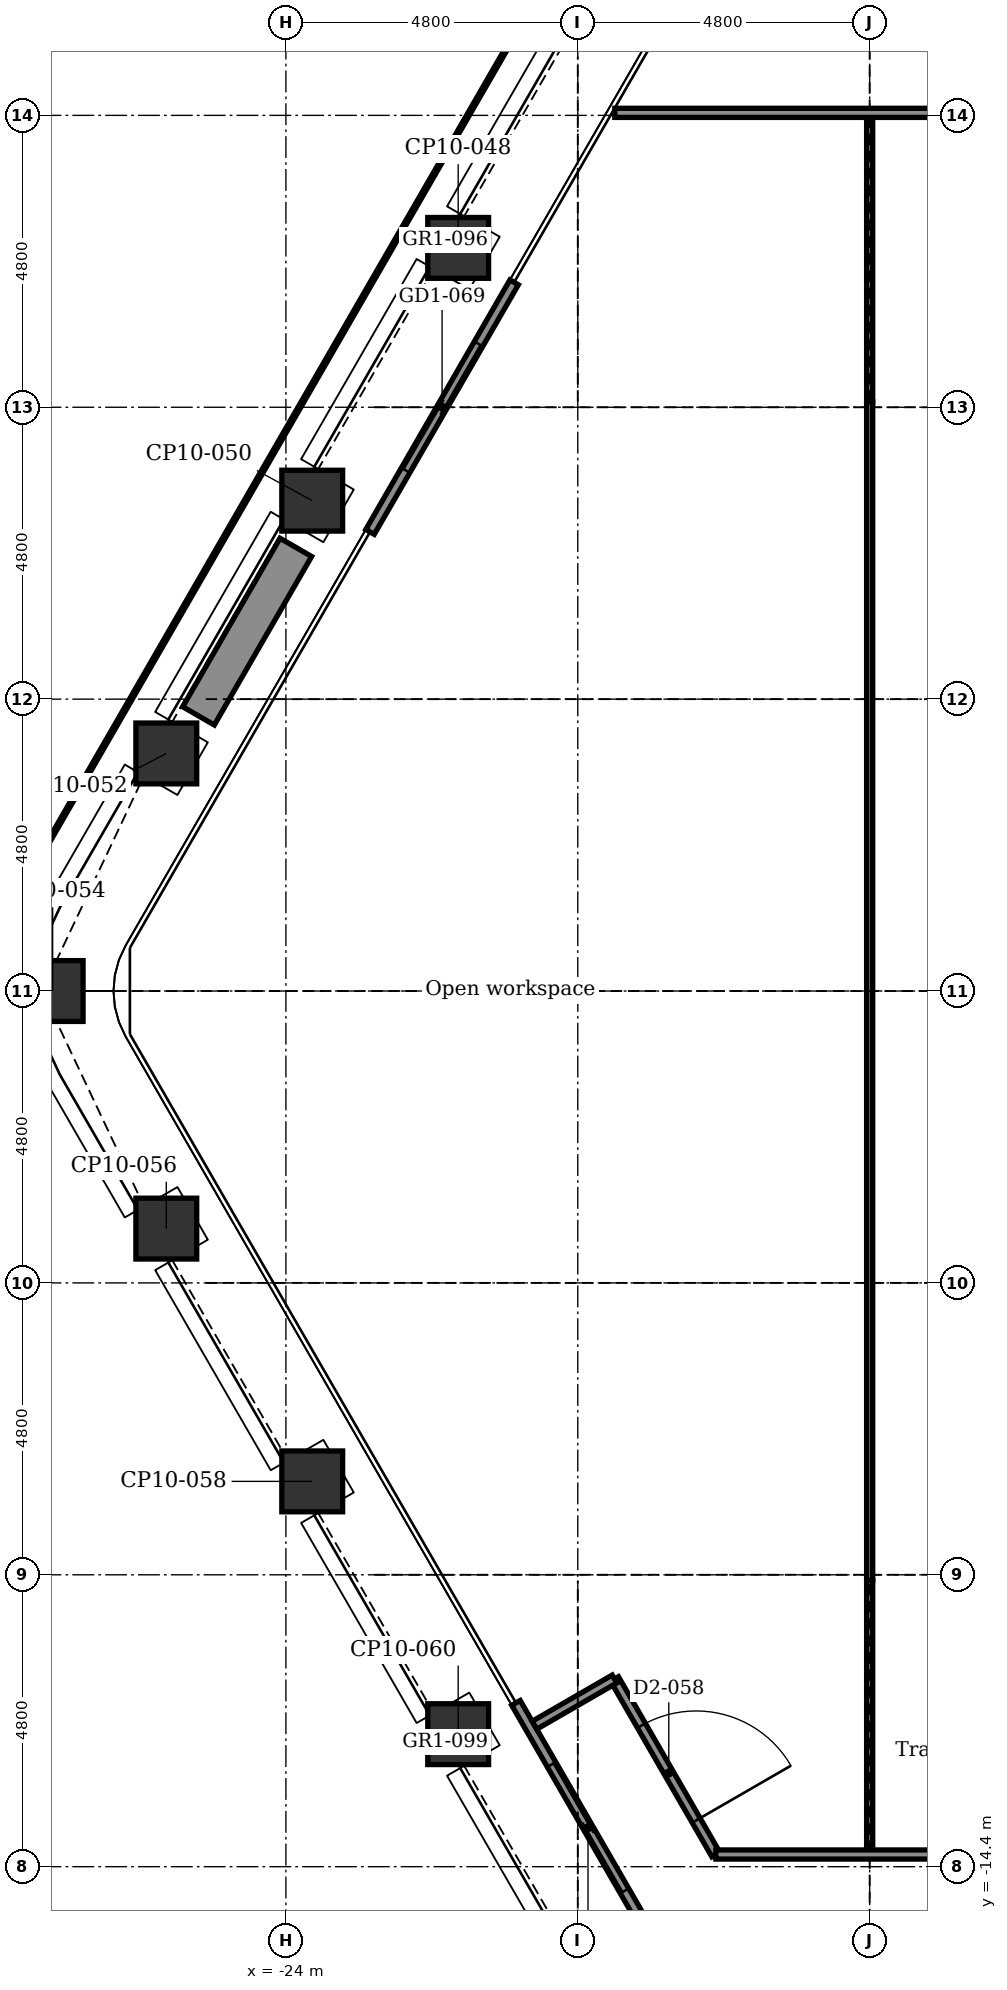
"""IFC4 building model, lengths in metres.
Left out: names, types, materials, properties, quantities, classifications, styles, units other than length and angle.
Written with IfcOpenShell. Run it as: python <this file> out.ifc"""

import sys

from ifc_helpers import new_model, si_unit, direction, frame, frame_2d, origin, origin_2d, place, context, subcontext, project, spatial, rectangle, extrude, element, fill, save


model = new_model("IFC4")
c1 = context("Model", 3, precision=1e-05, world=origin(), true_north=direction((0.0, 1.0)))
c2 = subcontext(c1, "Body", "Model", "MODEL_VIEW")
j1 = project(units=[si_unit("LENGTHUNIT", "METRE"), si_unit("PLANEANGLEUNIT", "RADIAN")], contexts=[c1])
p1 = place(None, origin())
s1 = spatial("IfcSite", under=j1, at=p1, CompositionType="ELEMENT")
p2 = place(p1, origin())
s2 = spatial("IfcBuilding", under=s1, at=p2, CompositionType="ELEMENT")
p3 = place(p2, frame((0.0, 0.0, 197.3)))
s3 = spatial("IfcBuildingStorey", under=s2, at=p3, CompositionType="ELEMENT", Elevation=197.3)
for number, where, z_axis, x_axis in (
    (1, (-21.167, -12.221, -0.15), (0.0, 0.0, 1.0), (0.866, 0.5, 0.0)),
    (2, (-23.567, -8.064, -0.15), (0.0, 0.0, 1.0), (0.866, 0.5, 0.0)),
    (3, (-25.967, -3.907, -0.15), (0.0, 0.0, 1.0), (0.866, 0.5, 0.0)),
    (4, (-27.836, 0.0, -0.15), (0.0, 0.0, 1.0), (1.0, 0.0, 0.0)),
    (5, (-25.967, 3.907, -0.15), (0.0, 0.0, 1.0), (0.5, 0.866, 0.0)),
    (6, (-23.567, 8.064, -0.15), (0.0, 0.0, 1.0), (0.5, 0.866, 0.0)),
    (7, (-21.167, 12.221, -0.15), (0.0, 0.0, 1.0), (0.5, 0.866, 0.0)),
):
    element("IfcColumn", number, at=place(p3, frame(where, z_axis=z_axis, x_axis=x_axis)), inside=s3, PredefinedType="COLUMN", context=c2, shape_type="SweptSolid", body=[
        extrude(rectangle(XDim=1.0, YDim=1.0, at=origin_2d()), origin(), (0.0, 0.0, 1.0), 3.9),
    ])
p4 = place(p3, frame((-17.847, -15.812, 0.0), z_axis=(0.0, 0.0, 1.0), x_axis=(-0.5000167099, 0.866015756104, 0.0)))
e8 = element("IfcWall", 8, at=p4, inside=s3, PredefinedType="PARTITIONING", context=c2, shape_type="SweptSolid", body=[
    extrude(rectangle(XDim=4.74, YDim=0.16, at=frame_2d((2.37, 0.0))), origin(), (0.0, 0.0, 1.0), 3.75),
])
p5 = place(p4, frame((1.17, 0.0, 0.0)))
e9 = element("IfcOpeningElement", 9, at=p5, cuts=e8, PredefinedType="OPENING", context=c2, shape_type="SweptSolid", body=[
    extrude(rectangle(XDim=2.4, YDim=2.4, at=frame_2d((1.2, 1.2))), frame((0.0, 0.09, 0.0), z_axis=(0.0, -1.0, 0.0), x_axis=(1.0, 0.0, 0.0)), (0.0, 0.0, 1.0), 0.18),
])
p6 = place(p3, frame((-22.617, 7.55, 0.0), z_axis=(0.0, 0.0, 1.0), x_axis=(0.5000167099, 0.866015756104, 0.0)))
e10 = element("IfcWall", 10, at=p6, inside=s3, PredefinedType="PARTITIONING", context=c2, shape_type="SweptSolid", body=[
    extrude(rectangle(XDim=4.74, YDim=0.16, at=frame_2d((2.37, 0.0))), origin(), (0.0, 0.0, 1.0), 3.75),
])
p7 = place(p6, frame((1.17, 0.0, 0.0)))
e11 = element("IfcOpeningElement", 11, at=p7, cuts=e10, PredefinedType="OPENING", context=c2, shape_type="SweptSolid", body=[
    extrude(rectangle(XDim=2.4, YDim=2.4, at=frame_2d((1.2, 1.2))), frame((0.0, 0.09, 0.0), z_axis=(0.0, -1.0, 0.0), x_axis=(1.0, 0.0, 0.0)), (0.0, 0.0, 1.0), 0.18),
])
p8 = place(p3, frame((-25.437, 4.525, 0.0), z_axis=(0.0, 0.0, 1.0), x_axis=(0.499938187974, 0.866061088033, 0.0)))
e12 = element("IfcWall", 12, at=p8, inside=s3, PredefinedType="USERDEFINED", context=c2, shape_type="SweptSolid", body=[
    extrude(rectangle(XDim=3.2, YDim=0.6, at=frame_2d((1.6, 0.0))), origin(), (0.0, 0.0, 1.0), 0.7),
])
p9 = place(p3, frame((-14.4, -9.694, 0.0), z_axis=(0.0, 0.0, 1.0), x_axis=(0.0, 1.0, 0.0)))
e13 = element("IfcWall", 13, at=p9, inside=s3, PredefinedType="PARTITIONING", context=c2, shape_type="SweptSolid", body=[
    extrude(rectangle(XDim=19.387, YDim=0.1, at=frame_2d((9.694, 0.0))), origin(), (0.0, 0.0, 1.0), 3.75),
])
p10 = place(p3, frame((-14.4, -14.2, 0.0), z_axis=(0.0, 0.0, 1.0), x_axis=(0.0, 1.0, 0.0)))
e14 = element("IfcWall", 14, at=p10, inside=s3, PredefinedType="PARTITIONING", context=c2, shape_type="SweptSolid", body=[
    extrude(rectangle(XDim=4.506, YDim=0.1, at=frame_2d((2.253, 0.0))), origin(), (0.0, 0.0, 1.0), 3.066),
])
p11 = place(p3, frame((-14.4, 9.694, 0.0), z_axis=(0.0, 0.0, 1.0), x_axis=(0.0, 1.0, 0.0)))
e15 = element("IfcWall", 15, at=p11, inside=s3, PredefinedType="PARTITIONING", context=c2, shape_type="SweptSolid", body=[
    extrude(rectangle(XDim=4.748, YDim=0.1, at=frame_2d((2.374, 0.0))), origin(), (0.0, 0.0, 1.0), 3.066),
])
p12 = place(p3, frame((-18.596, -11.314, 0.0), z_axis=(0.0, 0.0, 1.0), x_axis=(0.499976106316, -0.86603919837, 0.0)))
e16 = element("IfcWall", 16, at=p12, inside=s3, PredefinedType="PARTITIONING", context=c2, shape_type="SweptSolid", body=[
    extrude(rectangle(XDim=3.333, YDim=0.15, at=frame_2d((1.667, 0.0))), origin(), (0.0, 0.0, 1.0), 3.75),
])
p13 = place(p12, frame((0.885, 0.0, 0.0)))
e17 = element("IfcOpeningElement", 17, at=p13, cuts=e16, PredefinedType="OPENING", context=c2, shape_type="SweptSolid", body=[
    extrude(rectangle(XDim=1.8, YDim=2.1, at=frame_2d((0.9, 1.05))), frame((0.0, 0.085, 0.0), z_axis=(0.0, -1.0, 0.0), x_axis=(1.0, 0.0, 0.0)), (0.0, 0.0, 1.0), 0.17),
])
p14 = place(p3, frame((-19.912, -12.074, 0.0), z_axis=(0.0, 0.0, 1.0), x_axis=(0.866030456496, 0.499991248344, 0.0)))
e18 = element("IfcWall", 18, at=p14, inside=s3, PredefinedType="PARTITIONING", context=c2, shape_type="SweptSolid", body=[
    extrude(rectangle(XDim=1.52, YDim=0.15, at=frame_2d((0.76, 0.0))), origin(), (0.0, 0.0, 1.0), 3.75),
])
p15 = place(p3, frame((-16.93, -14.2, 0.0), z_axis=(0.0, 0.0, 1.0), x_axis=(1.0, 0.0, 0.0)))
e19 = element("IfcWall", 19, at=p15, inside=s3, PredefinedType="PARTITIONING", context=c2, shape_type="SweptSolid", body=[
    extrude(rectangle(XDim=19.93, YDim=0.15, at=frame_2d((9.965, 0.0))), origin(), (0.0, 0.0, 1.0), 3.75),
])
p16 = place(p15, frame((8.58, 0.0, 0.0)))
e20 = element("IfcOpeningElement", 20, at=p16, cuts=e19, PredefinedType="OPENING", context=c2, shape_type="SweptSolid", body=[
    extrude(rectangle(XDim=0.9, YDim=2.1, at=frame_2d((0.45, 1.05))), frame((0.0, 0.085, 0.0), z_axis=(0.0, -1.0, 0.0), x_axis=(1.0, 0.0, 0.0)), (0.0, 0.0, 1.0), 0.17),
])
p17 = place(p15, frame((14.08, 0.0, 0.0)))
e21 = element("IfcOpeningElement", 21, at=p17, cuts=e19, PredefinedType="OPENING", context=c2, shape_type="SweptSolid", body=[
    extrude(rectangle(XDim=0.9, YDim=2.1, at=frame_2d((0.45, 1.05))), frame((0.0, 0.085, 0.0), z_axis=(0.0, -1.0, 0.0), x_axis=(1.0, 0.0, 0.0)), (0.0, 0.0, 1.0), 0.17),
])
p18 = place(p3, frame((-18.592, 14.441, 0.0), z_axis=(0.0, 0.0, 1.0), x_axis=(1.0, 0.0, 0.0)))
e22 = element("IfcWall", 22, at=p18, inside=s3, PredefinedType="PARTITIONING", context=c2, shape_type="SweptSolid", body=[
    extrude(rectangle(XDim=11.991, YDim=0.15, at=frame_2d((5.996, 0.0))), origin(), (0.0, 0.0, 1.0), 3.75),
])
p19 = place(p18, frame((5.767, 0.0, 0.0)))
e23 = element("IfcOpeningElement", 23, at=p19, cuts=e22, PredefinedType="OPENING", context=c2, shape_type="SweptSolid", body=[
    extrude(rectangle(XDim=1.0, YDim=2.1, at=frame_2d((0.5, 1.05))), frame((0.0, 0.085, 0.0), z_axis=(0.0, -1.0, 0.0), x_axis=(1.0, 0.0, 0.0)), (0.0, 0.0, 1.0), 0.17),
])
p20 = place(p5, origin())
e24 = element("IfcDoor", 24, at=p20, inside=s3, OperationType="DOUBLE_DOOR_SLIDING", PredefinedType="DOOR", context=c2, shape_type="SweptSolid", body=[
    extrude(rectangle(XDim=2.4, YDim=2.4, at=frame_2d((1.2, 1.2))), frame((0.0, 0.025, 0.0), z_axis=(0.0, -1.0, 0.0), x_axis=(1.0, 0.0, 0.0)), (0.0, 0.0, 1.0), 0.05),
])
fill(e9, e24)
p21 = place(p7, origin())
e25 = element("IfcDoor", 25, at=p21, inside=s3, OperationType="DOUBLE_DOOR_SLIDING", PredefinedType="DOOR", context=c2, shape_type="SweptSolid", body=[
    extrude(rectangle(XDim=2.4, YDim=2.4, at=frame_2d((1.2, 1.2))), frame((0.0, 0.025, 0.0), z_axis=(0.0, -1.0, 0.0), x_axis=(1.0, 0.0, 0.0)), (0.0, 0.0, 1.0), 0.05),
])
fill(e11, e25)
p22 = place(p13, origin())
e26 = element("IfcDoor", 26, at=p22, inside=s3, OperationType="SINGLE_SWING_RIGHT", PredefinedType="DOOR", context=c2, shape_type="SweptSolid", body=[
    extrude(rectangle(XDim=1.8, YDim=2.1, at=frame_2d((0.9, 1.05))), frame((0.0, 0.025, 0.0), z_axis=(0.0, -1.0, 0.0), x_axis=(1.0, 0.0, 0.0)), (0.0, 0.0, 1.0), 0.05),
])
fill(e17, e26)
save(model, sys.argv[1])
